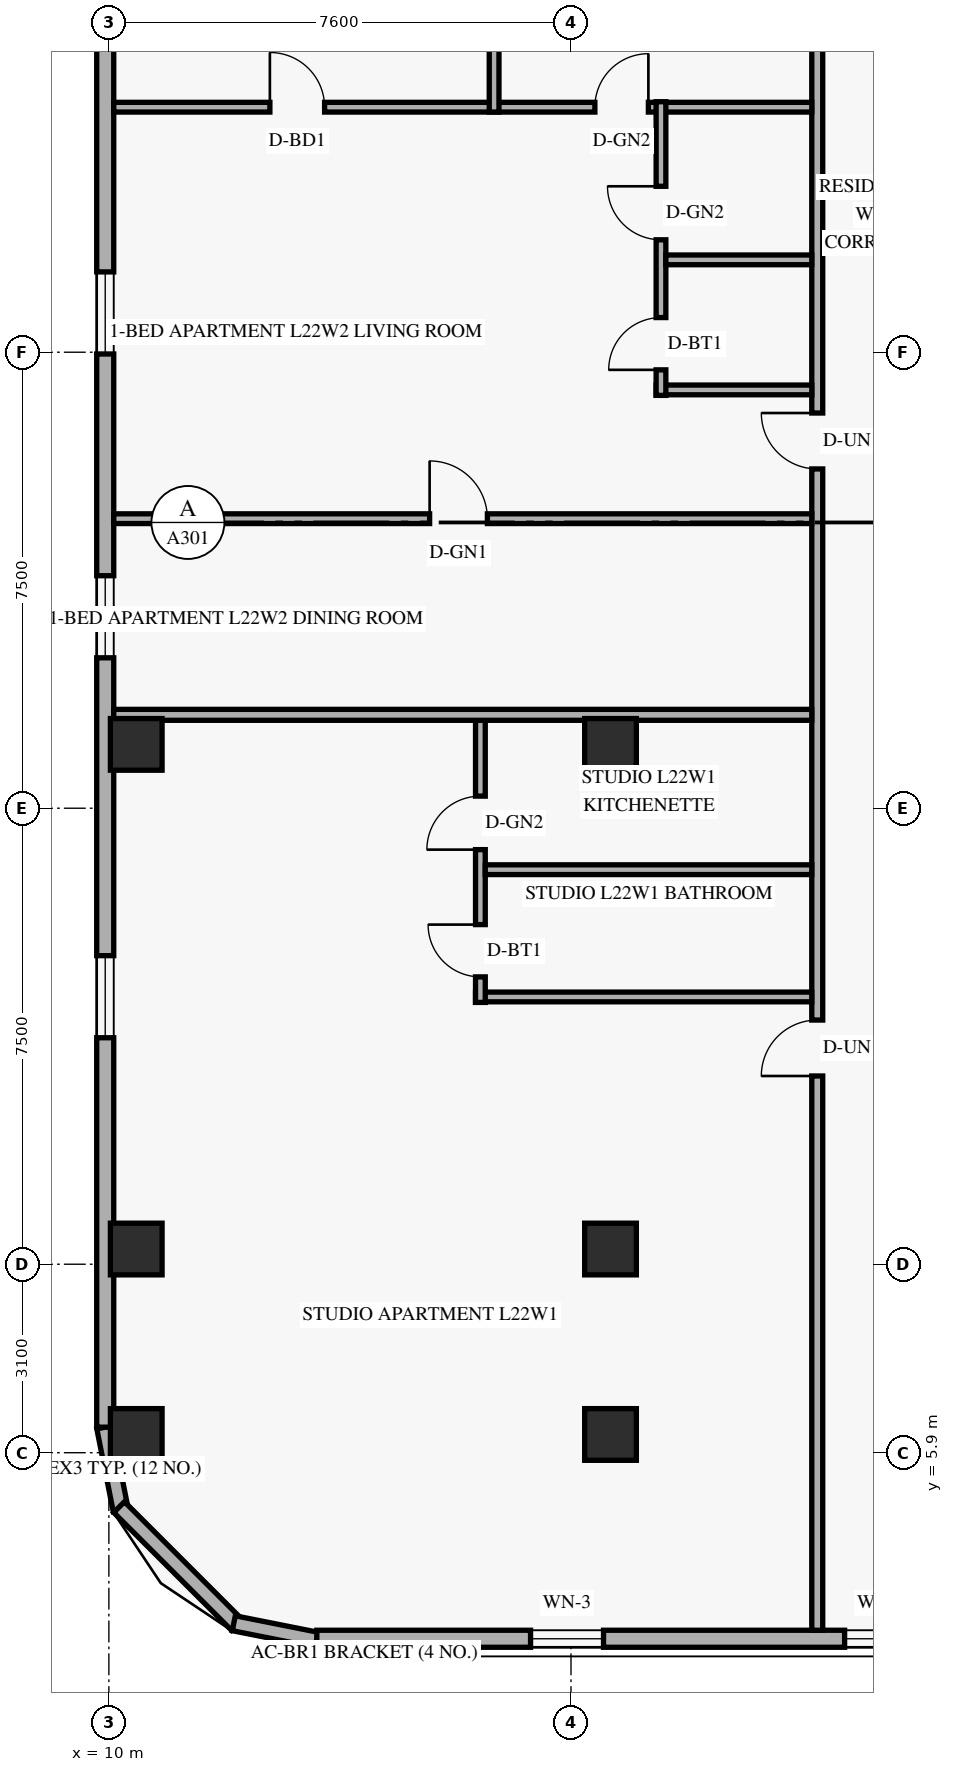
"""IFC4 building model, lengths in metres.
Left out: names, types, materials, properties, quantities, classifications, styles, units other than length and angle.
Written with IfcOpenShell. Run it as: python <this file> out.ifc"""

import sys

from ifc_helpers import new_model, si_unit, direction, frame, frame_2d, origin, origin_2d, place, context, subcontext, project, spatial, rectangle, extrude, element, fill, save


model = new_model("IFC4")
c1 = context("Model", 3, precision=1e-05, world=origin(), true_north=direction((0.0, 1.0)))
c2 = subcontext(c1, "Body", "Model", "MODEL_VIEW")
j1 = project(units=[si_unit("LENGTHUNIT", "METRE"), si_unit("PLANEANGLEUNIT", "RADIAN")], contexts=[c1])
p1 = place(None, origin())
s1 = spatial("IfcSite", under=j1, at=p1, CompositionType="ELEMENT")
p2 = place(p1, origin())
s2 = spatial("IfcBuilding", under=s1, at=p2, CompositionType="ELEMENT")
p3 = place(p2, frame((0.0, 0.0, 87.6)))
s3 = spatial("IfcBuildingStorey", under=s2, at=p3, CompositionType="ELEMENT", Elevation=87.6)
for number, where, z_axis, x_axis in (
    (1, (10.45, 6.2, 0.0), (0.0, 0.0, 1.0), (1.0, 0.0, 0.0)),
    (2, (10.45, 9.25, 0.0), (0.0, 0.0, 1.0), (1.0, 0.0, 0.0)),
    (3, (10.45, 17.55, 0.0), (0.0, 0.0, 1.0), (1.0, 0.0, 0.0)),
    (4, (18.25, 6.2, 0.0), (0.0, 0.0, 1.0), (1.0, 0.0, 0.0)),
    (5, (18.25, 9.25, 0.0), (0.0, 0.0, 1.0), (1.0, 0.0, 0.0)),
    (6, (18.25, 17.55, 0.0), (0.0, 0.0, 1.0), (1.0, 0.0, 0.0)),
):
    element("IfcColumn", number, at=place(p3, frame(where, z_axis=z_axis, x_axis=x_axis)), inside=s3, PredefinedType="COLUMN", context=c2, shape_type="SweptSolid", body=[
        extrude(rectangle(XDim=0.85, YDim=0.85, at=origin_2d()), origin(), (0.0, 0.0, 1.0), 3.6),
    ])
p4 = place(p3, frame((9.924, 6.316, 0.0), z_axis=(0.0, 0.0, 1.0), x_axis=(0.195000137217, -0.980803214965, 0.0)))
e7 = element("IfcWall", 7, at=p4, inside=s3, PredefinedType="SOLIDWALL", context=c2, shape_type="SweptSolid", body=[
    extrude(rectangle(XDim=1.388, YDim=0.25, at=frame_2d((0.694, 0.0))), origin(), (0.0, 0.0, 1.0), 3.36),
])
p5 = place(p3, frame((10.168, 5.005, 0.0), z_axis=(0.0, 0.0, 1.0), x_axis=(0.707151344399, -0.707062215165, 0.0)))
e8 = element("IfcWall", 8, at=p5, inside=s3, PredefinedType="SOLIDWALL", context=c2, shape_type="SweptSolid", body=[
    extrude(rectangle(XDim=2.739, YDim=0.25, at=frame_2d((1.37, 0.0))), origin(), (0.0, 0.0, 1.0), 3.36),
])
p6 = place(p3, frame((12.054, 3.095, 0.0), z_axis=(0.0, 0.0, 1.0), x_axis=(0.980809899341, -0.19496651342, 0.0)))
e9 = element("IfcWall", 9, at=p6, inside=s3, PredefinedType="SOLIDWALL", context=c2, shape_type="SweptSolid", body=[
    extrude(rectangle(XDim=1.389, YDim=0.25, at=frame_2d((0.694, 0.0))), origin(), (0.0, 0.0, 1.0), 3.36),
])
p7 = place(p3, frame((13.42, 2.84, 0.0), z_axis=(0.0, 0.0, 1.0), x_axis=(1.0, 0.0, 0.0)))
e10 = element("IfcWall", 10, at=p7, inside=s3, PredefinedType="SOLIDWALL", context=c2, shape_type="SweptSolid", body=[
    extrude(rectangle(XDim=36.56, YDim=0.28, at=frame_2d((18.28, 0.0))), origin(), (0.0, 0.0, 1.0), 3.36),
])
p8 = place(p7, frame((3.515, 0.0, 0.85)))
e11 = element("IfcOpeningElement", 11, at=p8, cuts=e10, PredefinedType="OPENING", context=c2, shape_type="SweptSolid", body=[
    extrude(rectangle(XDim=1.2, YDim=1.5, at=frame_2d((0.6, 0.75))), frame((0.0, 0.15, 0.0), z_axis=(0.0, -1.0, 0.0), x_axis=(1.0, 0.0, 0.0)), (0.0, 0.0, 1.0), 0.3),
])
p9 = place(p7, frame((8.68, 0.0, 0.85)))
e12 = element("IfcOpeningElement", 12, at=p9, cuts=e10, PredefinedType="OPENING", context=c2, shape_type="SweptSolid", body=[
    extrude(rectangle(XDim=1.2, YDim=1.5, at=frame_2d((0.6, 0.75))), frame((0.0, 0.15, 0.0), z_axis=(0.0, -1.0, 0.0), x_axis=(1.0, 0.0, 0.0)), (0.0, 0.0, 1.0), 0.3),
])
p10 = place(p7, frame((12.181, 0.0, 0.85)))
e13 = element("IfcOpeningElement", 13, at=p10, cuts=e10, PredefinedType="OPENING", context=c2, shape_type="SweptSolid", body=[
    extrude(rectangle(XDim=1.2, YDim=1.5, at=frame_2d((0.6, 0.75))), frame((0.0, 0.15, 0.0), z_axis=(0.0, -1.0, 0.0), x_axis=(1.0, 0.0, 0.0)), (0.0, 0.0, 1.0), 0.3),
])
p11 = place(p7, frame((18.016, 0.0, 0.85)))
e14 = element("IfcOpeningElement", 14, at=p11, cuts=e10, PredefinedType="OPENING", context=c2, shape_type="SweptSolid", body=[
    extrude(rectangle(XDim=1.2, YDim=1.5, at=frame_2d((0.6, 0.75))), frame((0.0, 0.15, 0.0), z_axis=(0.0, -1.0, 0.0), x_axis=(1.0, 0.0, 0.0)), (0.0, 0.0, 1.0), 0.3),
])
p12 = place(p7, frame((22.465, 0.0, 0.85)))
e15 = element("IfcOpeningElement", 15, at=p12, cuts=e10, PredefinedType="OPENING", context=c2, shape_type="SweptSolid", body=[
    extrude(rectangle(XDim=1.2, YDim=1.5, at=frame_2d((0.6, 0.75))), frame((0.0, 0.15, 0.0), z_axis=(0.0, -1.0, 0.0), x_axis=(1.0, 0.0, 0.0)), (0.0, 0.0, 1.0), 0.3),
])
p13 = place(p7, frame((29.745, 0.0, 0.85)))
e16 = element("IfcOpeningElement", 16, at=p13, cuts=e10, PredefinedType="OPENING", context=c2, shape_type="SweptSolid", body=[
    extrude(rectangle(XDim=1.2, YDim=1.5, at=frame_2d((0.6, 0.75))), frame((0.0, 0.15, 0.0), z_axis=(0.0, -1.0, 0.0), x_axis=(1.0, 0.0, 0.0)), (0.0, 0.0, 1.0), 0.3),
])
p14 = place(p3, frame((9.94, 41.68, 0.0), z_axis=(0.0, 0.0, 1.0), x_axis=(0.0, -1.0, 0.0)))
e17 = element("IfcWall", 17, at=p14, inside=s3, PredefinedType="SOLIDWALL", context=c2, shape_type="SweptSolid", body=[
    extrude(rectangle(XDim=35.36, YDim=0.28, at=frame_2d((17.68, 0.0))), origin(), (0.0, 0.0, 1.0), 3.36),
])
p15 = place(p14, frame((27.605, 0.0, 0.85)))
e18 = element("IfcOpeningElement", 18, at=p15, cuts=e17, PredefinedType="OPENING", context=c2, shape_type="SweptSolid", body=[
    extrude(rectangle(XDim=1.35, YDim=1.55, at=frame_2d((0.675, 0.775))), frame((0.0, 0.15, 0.0), z_axis=(0.0, -1.0, 0.0), x_axis=(1.0, 0.0, 0.0)), (0.0, 0.0, 1.0), 0.3),
])
p16 = place(p14, frame((21.356, 0.0, 0.85)))
e19 = element("IfcOpeningElement", 19, at=p16, cuts=e17, PredefinedType="OPENING", context=c2, shape_type="SweptSolid", body=[
    extrude(rectangle(XDim=1.35, YDim=1.55, at=frame_2d((0.675, 0.775))), frame((0.0, 0.15, 0.0), z_axis=(0.0, -1.0, 0.0), x_axis=(1.0, 0.0, 0.0)), (0.0, 0.0, 1.0), 0.3),
])
p17 = place(p14, frame((16.359, 0.0, 0.85)))
e20 = element("IfcOpeningElement", 20, at=p17, cuts=e17, PredefinedType="OPENING", context=c2, shape_type="SweptSolid", body=[
    extrude(rectangle(XDim=1.35, YDim=1.55, at=frame_2d((0.675, 0.775))), frame((0.0, 0.15, 0.0), z_axis=(0.0, -1.0, 0.0), x_axis=(1.0, 0.0, 0.0)), (0.0, 0.0, 1.0), 0.3),
])
p18 = place(p14, frame((9.425, 0.0, 0.85)))
e21 = element("IfcOpeningElement", 21, at=p18, cuts=e17, PredefinedType="OPENING", context=c2, shape_type="SweptSolid", body=[
    extrude(rectangle(XDim=1.35, YDim=1.55, at=frame_2d((0.675, 0.775))), frame((0.0, 0.15, 0.0), z_axis=(0.0, -1.0, 0.0), x_axis=(1.0, 0.0, 0.0)), (0.0, 0.0, 1.0), 0.3),
])
p19 = place(p14, frame((5.59, 0.0, 0.85)))
e22 = element("IfcOpeningElement", 22, at=p19, cuts=e17, PredefinedType="OPENING", context=c2, shape_type="SweptSolid", body=[
    extrude(rectangle(XDim=1.35, YDim=1.55, at=frame_2d((0.675, 0.775))), frame((0.0, 0.15, 0.0), z_axis=(0.0, -1.0, 0.0), x_axis=(1.0, 0.0, 0.0)), (0.0, 0.0, 1.0), 0.3),
])
p20 = place(p3, frame((21.65, 2.98, 0.0), z_axis=(0.0, 0.0, 1.0), x_axis=(0.0, 1.0, 0.0)))
e23 = element("IfcWall", 23, at=p20, inside=s3, PredefinedType="STANDARD", context=c2, shape_type="SweptSolid", body=[
    extrude(rectangle(XDim=42.04, YDim=0.18, at=frame_2d((21.02, 0.0))), origin(), (0.0, 0.0, 1.0), 2.731),
])
p21 = place(p20, frame((9.116, 0.0, 0.0)))
e24 = element("IfcOpeningElement", 24, at=p21, cuts=e23, PredefinedType="OPENING", context=c2, shape_type="SweptSolid", body=[
    extrude(rectangle(XDim=0.92, YDim=2.15, at=frame_2d((0.46, 1.075))), frame((0.0, 0.1, 0.0), z_axis=(0.0, -1.0, 0.0), x_axis=(1.0, 0.0, 0.0)), (0.0, 0.0, 1.0), 0.2),
])
p22 = place(p20, frame((19.1, 0.0, 0.0)))
e25 = element("IfcOpeningElement", 25, at=p22, cuts=e23, PredefinedType="OPENING", context=c2, shape_type="SweptSolid", body=[
    extrude(rectangle(XDim=0.92, YDim=2.15, at=frame_2d((0.46, 1.075))), frame((0.0, 0.1, 0.0), z_axis=(0.0, -1.0, 0.0), x_axis=(1.0, 0.0, 0.0)), (0.0, 0.0, 1.0), 0.2),
])
p23 = place(p20, frame((32.201, 0.0, 0.0)))
e26 = element("IfcOpeningElement", 26, at=p23, cuts=e23, PredefinedType="OPENING", context=c2, shape_type="SweptSolid", body=[
    extrude(rectangle(XDim=0.92, YDim=2.15, at=frame_2d((0.46, 1.075))), frame((0.0, 0.1, 0.0), z_axis=(0.0, -1.0, 0.0), x_axis=(1.0, 0.0, 0.0)), (0.0, 0.0, 1.0), 0.2),
])
p24 = place(p3, frame((16.03, 13.396, 0.0), z_axis=(0.0, 0.0, 1.0), x_axis=(1.0, 0.0, 0.0)))
e27 = element("IfcWall", 27, at=p24, inside=s3, PredefinedType="PLUMBINGWALL", context=c2, shape_type="SweptSolid", body=[
    extrude(rectangle(XDim=5.53, YDim=0.16, at=frame_2d((2.765, 0.0))), origin(), (0.0, 0.0, 1.0), 2.731),
])
p25 = place(p3, frame((16.11, 13.306, 0.0), z_axis=(0.0, 0.0, 1.0), x_axis=(0.0, 1.0, 0.0)))
e28 = element("IfcWall", 28, at=p25, inside=s3, PredefinedType="PLUMBINGWALL", context=c2, shape_type="SweptSolid", body=[
    extrude(rectangle(XDim=4.73, YDim=0.16, at=frame_2d((2.365, 0.0))), origin(), (0.0, 0.0, 1.0), 2.731),
])
p26 = place(p25, frame((0.42, 0.0, 0.0)))
e29 = element("IfcOpeningElement", 29, at=p26, cuts=e28, PredefinedType="OPENING", context=c2, shape_type="SweptSolid", body=[
    extrude(rectangle(XDim=0.86, YDim=2.12, at=frame_2d((0.43, 1.06))), frame((0.0, 0.09, 0.0), z_axis=(0.0, -1.0, 0.0), x_axis=(1.0, 0.0, 0.0)), (0.0, 0.0, 1.0), 0.18),
])
p27 = place(p25, frame((2.513, 0.0, 0.0)))
e30 = element("IfcOpeningElement", 30, at=p27, cuts=e28, PredefinedType="OPENING", context=c2, shape_type="SweptSolid", body=[
    extrude(rectangle(XDim=0.88, YDim=2.12, at=frame_2d((0.44, 1.06))), frame((0.0, 0.09, 0.0), z_axis=(0.0, -1.0, 0.0), x_axis=(1.0, 0.0, 0.0)), (0.0, 0.0, 1.0), 0.18),
])
p28 = place(p3, frame((16.19, 15.489, 0.0), z_axis=(0.0, 0.0, 1.0), x_axis=(1.0, 0.0, 0.0)))
e31 = element("IfcWall", 31, at=p28, inside=s3, PredefinedType="PLUMBINGWALL", context=c2, shape_type="SweptSolid", body=[
    extrude(rectangle(XDim=5.37, YDim=0.16, at=frame_2d((2.685, 0.0))), origin(), (0.0, 0.0, 1.0), 2.731),
])
p29 = place(p3, frame((10.08, 18.036, 0.0), z_axis=(0.0, 0.0, 1.0), x_axis=(1.0, 0.0, 0.0)))
e32 = element("IfcWall", 32, at=p29, inside=s3, PredefinedType="PARTITIONING", context=c2, shape_type="SweptSolid", body=[
    extrude(rectangle(XDim=11.48, YDim=0.18, at=frame_2d((5.74, 0.0))), origin(), (0.0, 0.0, 1.0), 2.731),
])
p30 = place(p3, frame((10.08, 28.03, 0.0), z_axis=(0.0, 0.0, 1.0), x_axis=(1.0, 0.0, 0.0)))
e33 = element("IfcWall", 33, at=p30, inside=s3, PredefinedType="PARTITIONING", context=c2, shape_type="SweptSolid", body=[
    extrude(rectangle(XDim=11.48, YDim=0.16, at=frame_2d((5.74, 0.0))), origin(), (0.0, 0.0, 1.0), 2.731),
])
p31 = place(p30, frame((7.913, 0.0, 0.0)))
e34 = element("IfcOpeningElement", 34, at=p31, cuts=e33, PredefinedType="OPENING", context=c2, shape_type="SweptSolid", body=[
    extrude(rectangle(XDim=0.88, YDim=2.12, at=frame_2d((0.44, 1.06))), frame((0.0, 0.09, 0.0), z_axis=(0.0, -1.0, 0.0), x_axis=(1.0, 0.0, 0.0)), (0.0, 0.0, 1.0), 0.18),
])
p32 = place(p30, frame((2.568, 0.0, 0.0)))
e35 = element("IfcOpeningElement", 35, at=p32, cuts=e33, PredefinedType="OPENING", context=c2, shape_type="SweptSolid", body=[
    extrude(rectangle(XDim=0.9, YDim=2.14, at=frame_2d((0.45, 1.07))), frame((0.0, 0.09, 0.0), z_axis=(0.0, -1.0, 0.0), x_axis=(1.0, 0.0, 0.0)), (0.0, 0.0, 1.0), 0.18),
])
p33 = place(p3, frame((19.0, 23.38, 0.0), z_axis=(0.0, 0.0, 1.0), x_axis=(1.0, 0.0, 0.0)))
e36 = element("IfcWall", 36, at=p33, inside=s3, PredefinedType="PLUMBINGWALL", context=c2, shape_type="SweptSolid", body=[
    extrude(rectangle(XDim=2.56, YDim=0.16, at=frame_2d((1.28, 0.0))), origin(), (0.0, 0.0, 1.0), 3.36),
])
p34 = place(p3, frame((19.08, 23.29, 0.0), z_axis=(0.0, 0.0, 1.0), x_axis=(0.0, 1.0, 0.0)))
e37 = element("IfcWall", 37, at=p34, inside=s3, PredefinedType="PLUMBINGWALL", context=c2, shape_type="SweptSolid", body=[
    extrude(rectangle(XDim=4.83, YDim=0.16, at=frame_2d((2.415, 0.0))), origin(), (0.0, 0.0, 1.0), 3.36),
])
p35 = place(p34, frame((0.42, 0.0, 0.0)))
e38 = element("IfcOpeningElement", 38, at=p35, cuts=e37, PredefinedType="OPENING", context=c2, shape_type="SweptSolid", body=[
    extrude(rectangle(XDim=0.86, YDim=2.12, at=frame_2d((0.43, 1.06))), frame((0.0, 0.09, 0.0), z_axis=(0.0, -1.0, 0.0), x_axis=(1.0, 0.0, 0.0)), (0.0, 0.0, 1.0), 0.18),
])
p36 = place(p34, frame((2.559, 0.0, 0.0)))
e39 = element("IfcOpeningElement", 39, at=p36, cuts=e37, PredefinedType="OPENING", context=c2, shape_type="SweptSolid", body=[
    extrude(rectangle(XDim=0.88, YDim=2.12, at=frame_2d((0.44, 1.06))), frame((0.0, 0.09, 0.0), z_axis=(0.0, -1.0, 0.0), x_axis=(1.0, 0.0, 0.0)), (0.0, 0.0, 1.0), 0.18),
])
p37 = place(p3, frame((19.16, 25.519, 0.0), z_axis=(0.0, 0.0, 1.0), x_axis=(1.0, 0.0, 0.0)))
e40 = element("IfcWall", 40, at=p37, inside=s3, PredefinedType="PLUMBINGWALL", context=c2, shape_type="SweptSolid", body=[
    extrude(rectangle(XDim=2.4, YDim=0.16, at=frame_2d((1.2, 0.0))), origin(), (0.0, 0.0, 1.0), 3.36),
])
p38 = place(p3, frame((10.08, 21.262, 0.0), z_axis=(0.0, 0.0, 1.0), x_axis=(1.0, 0.0, 0.0)))
e41 = element("IfcWall", 41, at=p38, inside=s3, PredefinedType="PARTITIONING", context=c2, shape_type="SweptSolid", body=[
    extrude(rectangle(XDim=11.48, YDim=0.16, at=frame_2d((5.74, 0.0))), origin(), (0.0, 0.0, 1.0), 2.731),
])
p39 = place(p38, frame((5.195, 0.0, 0.0)))
e42 = element("IfcOpeningElement", 42, at=p39, cuts=e41, PredefinedType="OPENING", context=c2, shape_type="SweptSolid", body=[
    extrude(rectangle(XDim=0.95, YDim=2.15, at=frame_2d((0.475, 1.075))), frame((0.0, 0.09, 0.0), z_axis=(0.0, -1.0, 0.0), x_axis=(1.0, 0.0, 0.0)), (0.0, 0.0, 1.0), 0.18),
])
p40 = place(p3, frame((16.335, 27.95, 0.0), z_axis=(0.0, 0.0, 1.0), x_axis=(0.0, 1.0, 0.0)))
e43 = element("IfcWall", 43, at=p40, inside=s3, PredefinedType="PARTITIONING", context=c2, shape_type="SweptSolid", body=[
    extrude(rectangle(XDim=4.96, YDim=0.16, at=frame_2d((2.48, 0.0))), origin(), (0.0, 0.0, 1.0), 2.731),
])
p41 = place(p8, origin())
e44 = element("IfcWindow", 44, at=p41, inside=s3, PartitioningType="SINGLE_PANEL", PredefinedType="WINDOW", context=c2, shape_type="SweptSolid", body=[
    extrude(rectangle(XDim=1.2, YDim=1.5, at=frame_2d((0.6, 0.75))), frame((0.0, 0.03, 0.0), z_axis=(0.0, -1.0, 0.0), x_axis=(1.0, 0.0, 0.0)), (0.0, 0.0, 1.0), 0.06),
])
fill(e11, e44)
p42 = place(p9, origin())
e45 = element("IfcWindow", 45, at=p42, inside=s3, PartitioningType="SINGLE_PANEL", PredefinedType="WINDOW", context=c2, shape_type="SweptSolid", body=[
    extrude(rectangle(XDim=1.2, YDim=1.5, at=frame_2d((0.6, 0.75))), frame((0.0, 0.03, 0.0), z_axis=(0.0, -1.0, 0.0), x_axis=(1.0, 0.0, 0.0)), (0.0, 0.0, 1.0), 0.06),
])
fill(e12, e45)
p43 = place(p15, origin())
e46 = element("IfcWindow", 46, at=p43, inside=s3, PartitioningType="SINGLE_PANEL", PredefinedType="WINDOW", context=c2, shape_type="SweptSolid", body=[
    extrude(rectangle(XDim=1.35, YDim=1.55, at=frame_2d((0.675, 0.775))), frame((0.0, 0.03, 0.0), z_axis=(0.0, -1.0, 0.0), x_axis=(1.0, 0.0, 0.0)), (0.0, 0.0, 1.0), 0.06),
])
fill(e18, e46)
p44 = place(p16, origin())
e47 = element("IfcWindow", 47, at=p44, inside=s3, PartitioningType="SINGLE_PANEL", PredefinedType="WINDOW", context=c2, shape_type="SweptSolid", body=[
    extrude(rectangle(XDim=1.35, YDim=1.55, at=frame_2d((0.675, 0.775))), frame((0.0, 0.03, 0.0), z_axis=(0.0, -1.0, 0.0), x_axis=(1.0, 0.0, 0.0)), (0.0, 0.0, 1.0), 0.06),
])
fill(e19, e47)
p45 = place(p17, origin())
e48 = element("IfcWindow", 48, at=p45, inside=s3, PartitioningType="SINGLE_PANEL", PredefinedType="WINDOW", context=c2, shape_type="SweptSolid", body=[
    extrude(rectangle(XDim=1.35, YDim=1.55, at=frame_2d((0.675, 0.775))), frame((0.0, 0.03, 0.0), z_axis=(0.0, -1.0, 0.0), x_axis=(1.0, 0.0, 0.0)), (0.0, 0.0, 1.0), 0.06),
])
fill(e20, e48)
p46 = place(p21, origin())
e49 = element("IfcDoor", 49, at=p46, inside=s3, OperationType="SINGLE_SWING_LEFT", PredefinedType="DOOR", context=c2, shape_type="SweptSolid", body=[
    extrude(rectangle(XDim=0.92, YDim=2.15, at=frame_2d((0.46, 1.075))), frame((0.0, 0.025, 0.0), z_axis=(0.0, -1.0, 0.0), x_axis=(1.0, 0.0, 0.0)), (0.0, 0.0, 1.0), 0.05),
])
fill(e24, e49)
p47 = place(p26, origin())
e50 = element("IfcDoor", 50, at=p47, inside=s3, OperationType="SINGLE_SWING_RIGHT", PredefinedType="DOOR", context=c2, shape_type="SweptSolid", body=[
    extrude(rectangle(XDim=0.86, YDim=2.12, at=frame_2d((0.43, 1.06))), frame((0.0, 0.025, 0.0), z_axis=(0.0, -1.0, 0.0), x_axis=(1.0, 0.0, 0.0)), (0.0, 0.0, 1.0), 0.05),
])
fill(e29, e50)
p48 = place(p27, origin())
e51 = element("IfcDoor", 51, at=p48, inside=s3, OperationType="SINGLE_SWING_LEFT", PredefinedType="DOOR", context=c2, shape_type="SweptSolid", body=[
    extrude(rectangle(XDim=0.88, YDim=2.12, at=frame_2d((0.44, 1.06))), frame((0.0, 0.025, 0.0), z_axis=(0.0, -1.0, 0.0), x_axis=(1.0, 0.0, 0.0)), (0.0, 0.0, 1.0), 0.05),
])
fill(e30, e51)
p49 = place(p39, origin())
e52 = element("IfcDoor", 52, at=p49, inside=s3, OperationType="SINGLE_SWING_LEFT", PredefinedType="DOOR", context=c2, shape_type="SweptSolid", body=[
    extrude(rectangle(XDim=0.95, YDim=2.15, at=frame_2d((0.475, 1.075))), frame((0.0, 0.025, 0.0), z_axis=(0.0, -1.0, 0.0), x_axis=(1.0, 0.0, 0.0)), (0.0, 0.0, 1.0), 0.05),
])
fill(e42, e52)
p50 = place(p22, origin())
e53 = element("IfcDoor", 53, at=p50, inside=s3, OperationType="SINGLE_SWING_RIGHT", PredefinedType="DOOR", context=c2, shape_type="SweptSolid", body=[
    extrude(rectangle(XDim=0.92, YDim=2.15, at=frame_2d((0.46, 1.075))), frame((0.0, 0.025, 0.0), z_axis=(0.0, -1.0, 0.0), x_axis=(1.0, 0.0, 0.0)), (0.0, 0.0, 1.0), 0.05),
])
fill(e25, e53)
p51 = place(p35, origin())
e54 = element("IfcDoor", 54, at=p51, inside=s3, OperationType="SINGLE_SWING_LEFT", PredefinedType="DOOR", context=c2, shape_type="SweptSolid", body=[
    extrude(rectangle(XDim=0.86, YDim=2.12, at=frame_2d((0.43, 1.06))), frame((0.0, 0.025, 0.0), z_axis=(0.0, -1.0, 0.0), x_axis=(1.0, 0.0, 0.0)), (0.0, 0.0, 1.0), 0.05),
])
fill(e38, e54)
p52 = place(p36, origin())
e55 = element("IfcDoor", 55, at=p52, inside=s3, OperationType="SINGLE_SWING_RIGHT", PredefinedType="DOOR", context=c2, shape_type="SweptSolid", body=[
    extrude(rectangle(XDim=0.88, YDim=2.12, at=frame_2d((0.44, 1.06))), frame((0.0, 0.025, 0.0), z_axis=(0.0, -1.0, 0.0), x_axis=(1.0, 0.0, 0.0)), (0.0, 0.0, 1.0), 0.05),
])
fill(e39, e55)
p53 = place(p31, origin())
e56 = element("IfcDoor", 56, at=p53, inside=s3, OperationType="SINGLE_SWING_RIGHT", PredefinedType="DOOR", context=c2, shape_type="SweptSolid", body=[
    extrude(rectangle(XDim=0.88, YDim=2.12, at=frame_2d((0.44, 1.06))), frame((0.0, 0.025, 0.0), z_axis=(0.0, -1.0, 0.0), x_axis=(1.0, 0.0, 0.0)), (0.0, 0.0, 1.0), 0.05),
])
fill(e34, e56)
p54 = place(p32, origin())
e57 = element("IfcDoor", 57, at=p54, inside=s3, OperationType="SINGLE_SWING_LEFT", PredefinedType="DOOR", context=c2, shape_type="SweptSolid", body=[
    extrude(rectangle(XDim=0.9, YDim=2.14, at=frame_2d((0.45, 1.07))), frame((0.0, 0.025, 0.0), z_axis=(0.0, -1.0, 0.0), x_axis=(1.0, 0.0, 0.0)), (0.0, 0.0, 1.0), 0.05),
])
fill(e35, e57)
save(model, sys.argv[1])
